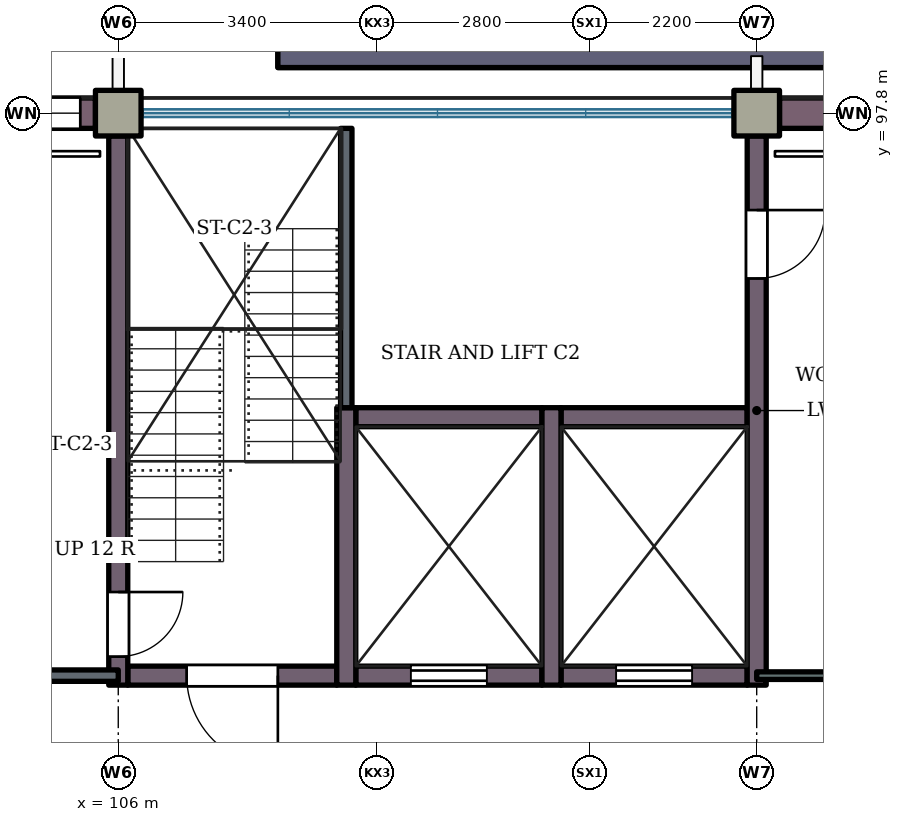
"""IFC4 building model, lengths in metres.
Left out: names, types, materials, properties, quantities, classifications, styles, units other than length and angle.
Written with IfcOpenShell. Run it as: python <this file> out.ifc"""

import sys

from ifc_helpers import new_model, si_unit, direction, frame, frame_2d, origin, origin_2d, place, context, subcontext, project, spatial, rectangle, extrude, element, fill, save


model = new_model("IFC4")
c1 = context("Model", 3, precision=1e-05, world=origin(), true_north=direction((0.0, 1.0)))
c2 = subcontext(c1, "Body", "Model", "MODEL_VIEW")
j1 = project(units=[si_unit("LENGTHUNIT", "METRE"), si_unit("PLANEANGLEUNIT", "RADIAN")], contexts=[c1])
p1 = place(None, origin())
s1 = spatial("IfcSite", under=j1, at=p1, CompositionType="ELEMENT")
p2 = place(p1, origin())
s2 = spatial("IfcBuilding", under=s1, at=p2, CompositionType="ELEMENT")
p3 = place(p2, frame((0.0, 0.0, 12.6)))
s3 = spatial("IfcBuildingStorey", under=s2, at=p3, CompositionType="ELEMENT", Elevation=12.6)
for number, where, z_axis, x_axis in (
    (1, (106.0, 97.8, 0.0), (0.0, 0.0, 1.0), (1.0, 0.0, 0.0)),
    (2, (114.4, 97.8, 0.0), (0.0, 0.0, 1.0), (1.0, 0.0, 0.0)),
):
    element("IfcColumn", number, at=place(p3, frame(where, z_axis=z_axis, x_axis=x_axis)), inside=s3, PredefinedType="COLUMN", context=c2, shape_type="SweptSolid", body=[
        extrude(rectangle(XDim=0.6, YDim=0.6, at=origin_2d()), origin(), (0.0, 0.0, 1.0), 4.2),
    ])
p4 = place(p3, frame((106.125, 90.4, 0.0), z_axis=(0.0, 0.0, 1.0), x_axis=(1.0, 0.0, 0.0)))
e3 = element("IfcWall", 3, at=p4, inside=s3, PredefinedType="SHEAR", context=c2, shape_type="SweptSolid", body=[
    extrude(rectangle(XDim=2.75, YDim=0.25, at=frame_2d((1.375, 0.0))), origin(), (0.0, 0.0, 1.0), 4.2),
])
p5 = place(p4, frame((0.775, 0.0, 0.0)))
e4 = element("IfcOpeningElement", 4, at=p5, cuts=e3, PredefinedType="OPENING", context=c2, shape_type="SweptSolid", body=[
    extrude(rectangle(XDim=1.2, YDim=2.1, at=frame_2d((0.6, 1.05))), frame((0.0, 0.135, 0.0), z_axis=(0.0, -1.0, 0.0), x_axis=(1.0, 0.0, 0.0)), (0.0, 0.0, 1.0), 0.27),
])
p6 = place(p3, frame((109.125, 90.4, 0.0), z_axis=(0.0, 0.0, 1.0), x_axis=(1.0, 0.0, 0.0)))
e5 = element("IfcWall", 5, at=p6, inside=s3, PredefinedType="SHEAR", context=c2, shape_type="SweptSolid", body=[
    extrude(rectangle(XDim=2.45, YDim=0.25, at=frame_2d((1.225, 0.0))), origin(), (0.0, 0.0, 1.0), 4.2),
])
p7 = place(p6, frame((0.725, 0.0, 0.0)))
e6 = element("IfcOpeningElement", 6, at=p7, cuts=e5, PredefinedType="OPENING", context=c2, shape_type="SweptSolid", body=[
    extrude(rectangle(XDim=1.0, YDim=2.1, at=frame_2d((0.5, 1.05))), frame((0.0, 0.135, 0.0), z_axis=(0.0, -1.0, 0.0), x_axis=(1.0, 0.0, 0.0)), (0.0, 0.0, 1.0), 0.27),
])
p8 = place(p3, frame((111.825, 90.4, 0.0), z_axis=(0.0, 0.0, 1.0), x_axis=(1.0, 0.0, 0.0)))
e7 = element("IfcWall", 7, at=p8, inside=s3, PredefinedType="SHEAR", context=c2, shape_type="SweptSolid", body=[
    extrude(rectangle(XDim=2.45, YDim=0.25, at=frame_2d((1.225, 0.0))), origin(), (0.0, 0.0, 1.0), 4.2),
])
p9 = place(p8, frame((0.725, 0.0, 0.0)))
e8 = element("IfcOpeningElement", 8, at=p9, cuts=e7, PredefinedType="OPENING", context=c2, shape_type="SweptSolid", body=[
    extrude(rectangle(XDim=1.0, YDim=2.1, at=frame_2d((0.5, 1.05))), frame((0.0, 0.135, 0.0), z_axis=(0.0, -1.0, 0.0), x_axis=(1.0, 0.0, 0.0)), (0.0, 0.0, 1.0), 0.27),
])
for number, where, z_axis, x_axis in (
    (9, (109.125, 93.8, 0.0), (0.0, 0.0, 1.0), (1.0, 0.0, 0.0)),
    (10, (111.825, 93.8, 0.0), (0.0, 0.0, 1.0), (1.0, 0.0, 0.0)),
):
    element("IfcWall", number, at=place(p3, frame(where, z_axis=z_axis, x_axis=x_axis)), inside=s3, PredefinedType="SHEAR", context=c2, shape_type="SweptSolid", body=[
        extrude(rectangle(XDim=2.45, YDim=0.25, at=frame_2d((1.225, 0.0))), origin(), (0.0, 0.0, 1.0), 4.2),
    ])
p10 = place(p3, frame((106.0, 90.275, 0.0), z_axis=(0.0, 0.0, 1.0), x_axis=(0.0, 1.0, 0.0)))
e11 = element("IfcWall", 11, at=p10, inside=s3, PredefinedType="SHEAR", context=c2, shape_type="SweptSolid", body=[
    extrude(rectangle(XDim=7.225, YDim=0.25, at=frame_2d((3.613, 0.0))), origin(), (0.0, 0.0, 1.0), 4.2),
])
p11 = place(p10, frame((0.375, 0.0, 0.0)))
e12 = element("IfcOpeningElement", 12, at=p11, cuts=e11, PredefinedType="OPENING", context=c2, shape_type="SweptSolid", body=[
    extrude(rectangle(XDim=0.85, YDim=2.1, at=frame_2d((0.425, 1.05))), frame((0.0, 0.135, 0.0), z_axis=(0.0, -1.0, 0.0), x_axis=(1.0, 0.0, 0.0)), (0.0, 0.0, 1.0), 0.27),
])
for number, where, z_axis, x_axis in (
    (13, (109.0, 90.275, 0.0), (0.0, 0.0, 1.0), (0.0, 1.0, 0.0)),
    (14, (111.7, 90.275, 0.0), (0.0, 0.0, 1.0), (0.0, 1.0, 0.0)),
):
    element("IfcWall", number, at=place(p3, frame(where, z_axis=z_axis, x_axis=x_axis)), inside=s3, PredefinedType="SHEAR", context=c2, shape_type="SweptSolid", body=[
        extrude(rectangle(XDim=3.65, YDim=0.25, at=frame_2d((1.825, 0.0))), origin(), (0.0, 0.0, 1.0), 4.2),
    ])
p12 = place(p3, frame((114.4, 90.275, 0.0), z_axis=(0.0, 0.0, 1.0), x_axis=(0.0, 1.0, 0.0)))
e15 = element("IfcWall", 15, at=p12, inside=s3, PredefinedType="SHEAR", context=c2, shape_type="SweptSolid", body=[
    extrude(rectangle(XDim=7.225, YDim=0.25, at=frame_2d((3.613, 0.0))), origin(), (0.0, 0.0, 1.0), 4.2),
])
p13 = place(p12, frame((5.35, 0.0, 0.0)))
e16 = element("IfcOpeningElement", 16, at=p13, cuts=e15, PredefinedType="OPENING", context=c2, shape_type="SweptSolid", body=[
    extrude(rectangle(XDim=0.9, YDim=2.1, at=frame_2d((0.45, 1.05))), frame((0.0, 0.135, 0.0), z_axis=(0.0, -1.0, 0.0), x_axis=(1.0, 0.0, 0.0)), (0.0, 0.0, 1.0), 0.27),
])
p14 = place(p3, frame((97.9, 97.8, 0.0), z_axis=(0.0, 0.0, 1.0), x_axis=(1.0, 0.0, 0.0)))
e17 = element("IfcWall", 17, at=p14, inside=s3, PredefinedType="SOLIDWALL", context=c2, shape_type="SweptSolid", body=[
    extrude(rectangle(XDim=7.8, YDim=0.4, at=frame_2d((3.9, 0.0))), origin(), (0.0, 0.0, 1.0), 3.32),
])
p15 = place(p14, frame((0.2, 0.0, 0.6)))
e18 = element("IfcOpeningElement", 18, at=p15, cuts=e17, PredefinedType="OPENING", context=c2, shape_type="SweptSolid", body=[
    extrude(rectangle(XDim=1.8, YDim=2.4, at=frame_2d((0.9, 1.2))), frame((0.0, 0.21, 0.0), z_axis=(0.0, -1.0, 0.0), x_axis=(1.0, 0.0, 0.0)), (0.0, 0.0, 1.0), 0.42),
])
p16 = place(p14, frame((3.0, 0.0, 0.6)))
e19 = element("IfcOpeningElement", 19, at=p16, cuts=e17, PredefinedType="OPENING", context=c2, shape_type="SweptSolid", body=[
    extrude(rectangle(XDim=1.8, YDim=2.4, at=frame_2d((0.9, 1.2))), frame((0.0, 0.21, 0.0), z_axis=(0.0, -1.0, 0.0), x_axis=(1.0, 0.0, 0.0)), (0.0, 0.0, 1.0), 0.42),
])
p17 = place(p14, frame((5.8, 0.0, 0.6)))
e20 = element("IfcOpeningElement", 20, at=p17, cuts=e17, PredefinedType="OPENING", context=c2, shape_type="SweptSolid", body=[
    extrude(rectangle(XDim=1.8, YDim=2.4, at=frame_2d((0.9, 1.2))), frame((0.0, 0.21, 0.0), z_axis=(0.0, -1.0, 0.0), x_axis=(1.0, 0.0, 0.0)), (0.0, 0.0, 1.0), 0.42),
])
p18 = place(p3, frame((114.7, 97.8, 0.0), z_axis=(0.0, 0.0, 1.0), x_axis=(1.0, 0.0, 0.0)))
e21 = element("IfcWall", 21, at=p18, inside=s3, PredefinedType="SOLIDWALL", context=c2, shape_type="SweptSolid", body=[
    extrude(rectangle(XDim=7.8, YDim=0.4, at=frame_2d((3.9, 0.0))), origin(), (0.0, 0.0, 1.0), 3.32),
])
p19 = place(p18, frame((0.8, 0.0, 2.1)))
e22 = element("IfcOpeningElement", 22, at=p19, cuts=e21, PredefinedType="OPENING", context=c2, shape_type="SweptSolid", body=[
    extrude(rectangle(XDim=0.6, YDim=0.9, at=frame_2d((0.3, 0.45))), frame((0.0, 0.21, 0.0), z_axis=(0.0, -1.0, 0.0), x_axis=(1.0, 0.0, 0.0)), (0.0, 0.0, 1.0), 0.42),
])
p20 = place(p18, frame((3.525, 0.0, 2.1)))
e23 = element("IfcOpeningElement", 23, at=p20, cuts=e21, PredefinedType="OPENING", context=c2, shape_type="SweptSolid", body=[
    extrude(rectangle(XDim=0.75, YDim=0.9, at=frame_2d((0.375, 0.45))), frame((0.0, 0.21, 0.0), z_axis=(0.0, -1.0, 0.0), x_axis=(1.0, 0.0, 0.0)), (0.0, 0.0, 1.0), 0.42),
])
p21 = place(p18, frame((6.4, 0.0, 2.1)))
e24 = element("IfcOpeningElement", 24, at=p21, cuts=e21, PredefinedType="OPENING", context=c2, shape_type="SweptSolid", body=[
    extrude(rectangle(XDim=0.6, YDim=0.9, at=frame_2d((0.3, 0.45))), frame((0.0, 0.21, 0.0), z_axis=(0.0, -1.0, 0.0), x_axis=(1.0, 0.0, 0.0)), (0.0, 0.0, 1.0), 0.42),
])
p22 = place(p3, frame((108.1, 98.9, 0.0), z_axis=(0.0, 0.0, 1.0), x_axis=(1.0, 0.0, 0.0)))
e25 = element("IfcWall", 25, at=p22, inside=s3, PredefinedType="STANDARD", context=c2, shape_type="SweptSolid", body=[
    extrude(rectangle(XDim=12.6, YDim=1.0, at=frame_2d((6.3, 0.0))), origin(), (0.0, 0.0, 1.0), 2.6),
])
p23 = place(p3, frame((108.1, 98.9, 2.6), z_axis=(0.0, 0.0, 1.0), x_axis=(1.0, 0.0, 0.0)))
e26 = element("IfcWall", 26, at=p23, inside=s3, PredefinedType="STANDARD", context=c2, shape_type="SweptSolid", body=[
    extrude(rectangle(XDim=12.6, YDim=1.0, at=frame_2d((6.3, 0.0))), origin(), (0.0, 0.0, 1.0), 1.6),
])
p24 = place(p3, frame((89.2, 90.4, 0.0), z_axis=(0.0, 0.0, 1.0), x_axis=(1.0, 0.0, 0.0)))
e27 = element("IfcWall", 27, at=p24, inside=s3, PredefinedType="PARTITIONING", context=c2, shape_type="SweptSolid", body=[
    extrude(rectangle(XDim=16.8, YDim=0.15, at=frame_2d((8.4, 0.0))), origin(), (0.0, 0.0, 1.0), 3.92),
])
p25 = place(p24, frame((3.775, 0.0, 0.0)))
e28 = element("IfcOpeningElement", 28, at=p25, cuts=e27, PredefinedType="OPENING", context=c2, shape_type="SweptSolid", body=[
    extrude(rectangle(XDim=0.85, YDim=2.1, at=frame_2d((0.425, 1.05))), frame((0.0, 0.085, 0.0), z_axis=(0.0, -1.0, 0.0), x_axis=(1.0, 0.0, 0.0)), (0.0, 0.0, 1.0), 0.17),
])
p26 = place(p24, frame((12.175, 0.0, 0.0)))
e29 = element("IfcOpeningElement", 29, at=p26, cuts=e27, PredefinedType="OPENING", context=c2, shape_type="SweptSolid", body=[
    extrude(rectangle(XDim=0.85, YDim=2.1, at=frame_2d((0.425, 1.05))), frame((0.0, 0.085, 0.0), z_axis=(0.0, -1.0, 0.0), x_axis=(1.0, 0.0, 0.0)), (0.0, 0.0, 1.0), 0.17),
])
p27 = place(p3, frame((114.4, 90.4, 0.0), z_axis=(0.0, 0.0, 1.0), x_axis=(1.0, 0.0, 0.0)))
e30 = element("IfcWall", 30, at=p27, inside=s3, PredefinedType="PARTITIONING", context=c2, shape_type="SweptSolid", body=[
    extrude(rectangle(XDim=8.4, YDim=0.1, at=frame_2d((4.2, 0.0))), origin(), (0.0, 0.0, 1.0), 3.92),
])
p28 = place(p27, frame((1.35, 0.0, 0.0)))
e31 = element("IfcOpeningElement", 31, at=p28, cuts=e30, PredefinedType="OPENING", context=c2, shape_type="SweptSolid", body=[
    extrude(rectangle(XDim=0.9, YDim=2.1, at=frame_2d((0.45, 1.05))), frame((0.0, 0.06, 0.0), z_axis=(0.0, -1.0, 0.0), x_axis=(1.0, 0.0, 0.0)), (0.0, 0.0, 1.0), 0.12),
])
p29 = place(p27, frame((4.225, 0.0, 0.0)))
e32 = element("IfcOpeningElement", 32, at=p29, cuts=e30, PredefinedType="OPENING", context=c2, shape_type="SweptSolid", body=[
    extrude(rectangle(XDim=1.15, YDim=2.1, at=frame_2d((0.575, 1.05))), frame((0.0, 0.06, 0.0), z_axis=(0.0, -1.0, 0.0), x_axis=(1.0, 0.0, 0.0)), (0.0, 0.0, 1.0), 0.12),
])
p30 = place(p27, frame((6.15, 0.0, 0.0)))
e33 = element("IfcOpeningElement", 33, at=p30, cuts=e30, PredefinedType="OPENING", context=c2, shape_type="SweptSolid", body=[
    extrude(rectangle(XDim=0.9, YDim=2.1, at=frame_2d((0.45, 1.05))), frame((0.0, 0.06, 0.0), z_axis=(0.0, -1.0, 0.0), x_axis=(1.0, 0.0, 0.0)), (0.0, 0.0, 1.0), 0.12),
])
p31 = place(p3, frame((109.0, 93.925, 0.0), z_axis=(0.0, 0.0, 1.0), x_axis=(0.0, 1.0, 0.0)))
e34 = element("IfcWall", 34, at=p31, inside=s3, PredefinedType="PARTITIONING", context=c2, shape_type="SweptSolid", body=[
    extrude(rectangle(XDim=3.675, YDim=0.15, at=frame_2d((1.837, 0.0))), origin(), (0.0, 0.0, 1.0), 3.92),
])
p32 = place(p17, origin())
e35 = element("IfcWindow", 35, at=p32, inside=s3, PartitioningType="SINGLE_PANEL", PredefinedType="WINDOW", context=c2, shape_type="SweptSolid", body=[
    extrude(rectangle(XDim=1.8, YDim=2.4, at=frame_2d((0.9, 1.2))), frame((0.0, 0.03, 0.0), z_axis=(0.0, -1.0, 0.0), x_axis=(1.0, 0.0, 0.0)), (0.0, 0.0, 1.0), 0.06),
])
fill(e20, e35)
p33 = place(p11, origin())
e36 = element("IfcDoor", 36, at=p33, inside=s3, OperationType="SINGLE_SWING_RIGHT", PredefinedType="DOOR", context=c2, shape_type="SweptSolid", body=[
    extrude(rectangle(XDim=0.85, YDim=2.1, at=frame_2d((0.425, 1.05))), frame((0.0, 0.025, 0.0), z_axis=(0.0, -1.0, 0.0), x_axis=(1.0, 0.0, 0.0)), (0.0, 0.0, 1.0), 0.05),
])
fill(e12, e36)
p34 = place(p13, origin())
e37 = element("IfcDoor", 37, at=p34, inside=s3, OperationType="SINGLE_SWING_RIGHT", PredefinedType="DOOR", context=c2, shape_type="SweptSolid", body=[
    extrude(rectangle(XDim=0.9, YDim=2.1, at=frame_2d((0.45, 1.05))), frame((0.0, 0.025, 0.0), z_axis=(0.0, -1.0, 0.0), x_axis=(1.0, 0.0, 0.0)), (0.0, 0.0, 1.0), 0.05),
])
fill(e16, e37)
p35 = place(p5, origin())
e38 = element("IfcDoor", 38, at=p35, inside=s3, OperationType="SINGLE_SWING_RIGHT", PredefinedType="DOOR", context=c2, shape_type="SweptSolid", body=[
    extrude(rectangle(XDim=1.2, YDim=2.1, at=frame_2d((0.6, 1.05))), frame((0.0, 0.025, 0.0), z_axis=(0.0, -1.0, 0.0), x_axis=(1.0, 0.0, 0.0)), (0.0, 0.0, 1.0), 0.05),
])
fill(e4, e38)
p36 = place(p7, origin())
e39 = element("IfcDoor", 39, at=p36, inside=s3, OperationType="SLIDING_TO_LEFT", PredefinedType="DOOR", context=c2, shape_type="SweptSolid", body=[
    extrude(rectangle(XDim=1.0, YDim=2.1, at=frame_2d((0.5, 1.05))), frame((0.0, 0.025, 0.0), z_axis=(0.0, -1.0, 0.0), x_axis=(1.0, 0.0, 0.0)), (0.0, 0.0, 1.0), 0.05),
])
fill(e6, e39)
p37 = place(p9, origin())
e40 = element("IfcDoor", 40, at=p37, inside=s3, OperationType="SLIDING_TO_LEFT", PredefinedType="DOOR", context=c2, shape_type="SweptSolid", body=[
    extrude(rectangle(XDim=1.0, YDim=2.1, at=frame_2d((0.5, 1.05))), frame((0.0, 0.025, 0.0), z_axis=(0.0, -1.0, 0.0), x_axis=(1.0, 0.0, 0.0)), (0.0, 0.0, 1.0), 0.05),
])
fill(e8, e40)
save(model, sys.argv[1])
